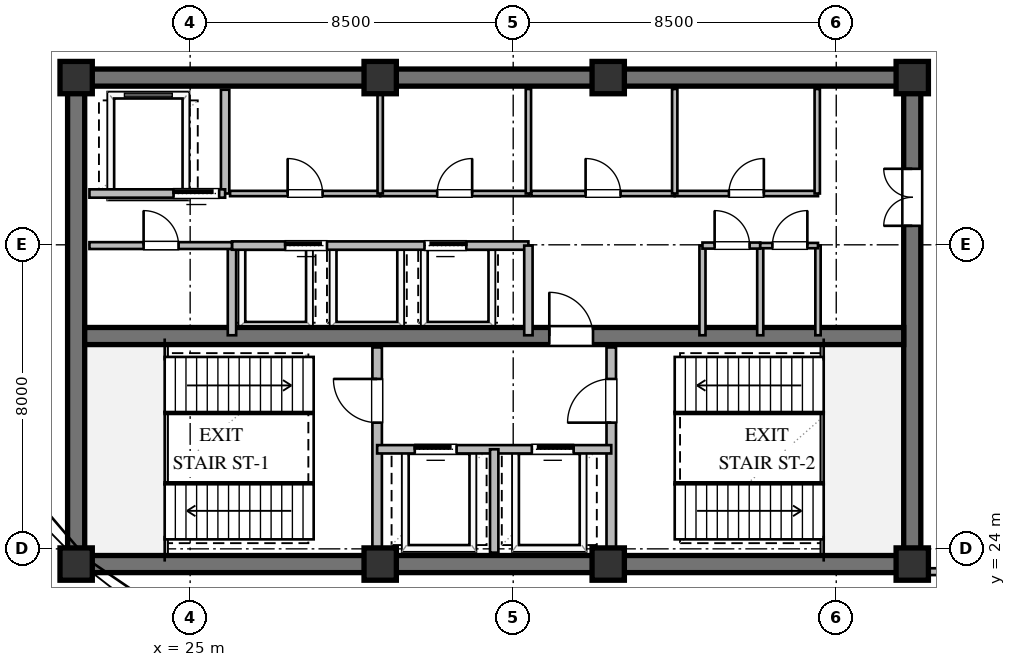
"""IFC4 building model, lengths in metres.
Left out: names, types, materials, properties, quantities, classifications, styles, units other than length and angle.
Written with IfcOpenShell. Run it as: python <this file> out.ifc"""

import sys

from ifc_helpers import new_model, si_unit, direction, frame, frame_2d, origin, origin_2d, place, context, subcontext, project, spatial, rectangle, extrude, element, fill, save


model = new_model("IFC4")
c1 = context("Model", 3, precision=1e-05, world=origin(), true_north=direction((0.0, 1.0)))
c2 = subcontext(c1, "Body", "Model", "MODEL_VIEW")
j1 = project(units=[si_unit("LENGTHUNIT", "METRE"), si_unit("PLANEANGLEUNIT", "RADIAN")], contexts=[c1])
p1 = place(None, origin())
s1 = spatial("IfcSite", under=j1, at=p1, CompositionType="ELEMENT")
p2 = place(p1, origin())
s2 = spatial("IfcBuilding", under=s1, at=p2, CompositionType="ELEMENT")
p3 = place(p2, frame((0.0, 0.0, 253.2)))
s3 = spatial("IfcBuildingStorey", under=s2, at=p3, CompositionType="ELEMENT", Elevation=253.2)
for number, where, z_axis, x_axis in (
    (1, (21.775, 23.6, 0.0), (0.0, 0.0, 1.0), (1.0, 0.0, 0.0)),
    (2, (21.775, 36.4, 0.0), (0.0, 0.0, 1.0), (1.0, 0.0, 0.0)),
):
    element("IfcWall", number, at=place(p3, frame(where, z_axis=z_axis, x_axis=x_axis)), inside=s3, PredefinedType="SHEAR", context=c2, shape_type="SweptSolid", body=[
        extrude(rectangle(XDim=22.45, YDim=0.45, at=frame_2d((11.225, 0.0))), origin(), (0.0, 0.0, 1.0), 5.16),
    ])
p4 = place(p3, frame((22.0, 23.825, 0.0), z_axis=(0.0, 0.0, 1.0), x_axis=(0.0, 1.0, 0.0)))
e3 = element("IfcWall", 3, at=p4, inside=s3, PredefinedType="SHEAR", context=c2, shape_type="SweptSolid", body=[
    extrude(rectangle(XDim=12.35, YDim=0.45, at=frame_2d((6.175, 0.0))), origin(), (0.0, 0.0, 1.0), 5.16),
])
p5 = place(p3, frame((44.0, 23.825, 0.0), z_axis=(0.0, 0.0, 1.0), x_axis=(0.0, 1.0, 0.0)))
e4 = element("IfcWall", 4, at=p5, inside=s3, PredefinedType="SHEAR", context=c2, shape_type="SweptSolid", body=[
    extrude(rectangle(XDim=12.35, YDim=0.45, at=frame_2d((6.175, 0.0))), origin(), (0.0, 0.0, 1.0), 5.16),
])
p6 = place(p5, frame((8.675, 0.0, 0.0)))
e5 = element("IfcOpeningElement", 5, at=p6, cuts=e4, PredefinedType="OPENING", context=c2, shape_type="SweptSolid", body=[
    extrude(rectangle(XDim=1.5, YDim=2.15, at=frame_2d((0.75, 1.075))), frame((0.0, 0.235, 0.0), z_axis=(0.0, -1.0, 0.0), x_axis=(1.0, 0.0, 0.0)), (0.0, 0.0, 1.0), 0.47),
])
p7 = place(p3, frame((22.225, 29.6, 0.0), z_axis=(0.0, 0.0, 1.0), x_axis=(1.0, 0.0, 0.0)))
e6 = element("IfcWall", 6, at=p7, inside=s3, PredefinedType="SHEAR", context=c2, shape_type="SweptSolid", body=[
    extrude(rectangle(XDim=21.55, YDim=0.45, at=frame_2d((10.775, 0.0))), origin(), (0.0, 0.0, 1.0), 5.16),
])
p8 = place(p7, frame((12.225, 0.0, 0.0)))
e7 = element("IfcOpeningElement", 7, at=p8, cuts=e6, PredefinedType="OPENING", context=c2, shape_type="SweptSolid", body=[
    extrude(rectangle(XDim=1.15, YDim=2.1, at=frame_2d((0.575, 1.05))), frame((0.0, 0.235, 0.0), z_axis=(0.0, -1.0, 0.0), x_axis=(1.0, 0.0, 0.0)), (0.0, 0.0, 1.0), 0.47),
])
for number, where, z_axis, x_axis in (
    (8, (22.0, 23.6, 0.0), (0.0, 0.0, 1.0), (1.0, 0.0, 0.0)),
    (9, (30.0, 23.6, 0.0), (0.0, 0.0, 1.0), (1.0, 0.0, 0.0)),
    (10, (36.0, 23.6, 0.0), (0.0, 0.0, 1.0), (1.0, 0.0, 0.0)),
    (11, (44.0, 23.6, 0.0), (0.0, 0.0, 1.0), (1.0, 0.0, 0.0)),
    (12, (44.0, 36.4, 0.0), (0.0, 0.0, 1.0), (1.0, 0.0, 0.0)),
    (13, (36.0, 36.4, 0.0), (0.0, 0.0, 1.0), (1.0, 0.0, 0.0)),
    (14, (30.0, 36.4, 0.0), (0.0, 0.0, 1.0), (1.0, 0.0, 0.0)),
    (15, (22.0, 36.4, 0.0), (0.0, 0.0, 1.0), (1.0, 0.0, 0.0)),
):
    element("IfcColumn", number, at=place(p3, frame(where, z_axis=z_axis, x_axis=x_axis)), inside=s3, PredefinedType="COLUMN", context=c2, shape_type="SweptSolid", body=[
        extrude(rectangle(XDim=0.85, YDim=0.85, at=origin_2d()), origin(), (0.0, 0.0, 1.0), 5.4),
    ])
p9 = place(p3, frame((29.92, 23.9, 0.0), z_axis=(0.0, 0.0, 1.0), x_axis=(0.0, 1.0, 0.0)))
e16 = element("IfcWall", 16, at=p9, inside=s3, PredefinedType="SOLIDWALL", context=c2, shape_type="SweptSolid", body=[
    extrude(rectangle(XDim=5.4, YDim=0.25, at=frame_2d((2.7, 0.0))), origin(), (0.0, 0.0, 1.0), 3.65),
])
p10 = place(p9, frame((3.421, 0.0, 0.0)))
e17 = element("IfcOpeningElement", 17, at=p10, cuts=e16, PredefinedType="OPENING", context=c2, shape_type="SweptSolid", body=[
    extrude(rectangle(XDim=1.15, YDim=2.1, at=frame_2d((0.575, 1.05))), frame((0.0, 0.135, 0.0), z_axis=(0.0, -1.0, 0.0), x_axis=(1.0, 0.0, 0.0)), (0.0, 0.0, 1.0), 0.27),
])
p11 = place(p3, frame((36.08, 23.9, 0.0), z_axis=(0.0, 0.0, 1.0), x_axis=(0.0, 1.0, 0.0)))
e18 = element("IfcWall", 18, at=p11, inside=s3, PredefinedType="SOLIDWALL", context=c2, shape_type="SweptSolid", body=[
    extrude(rectangle(XDim=5.4, YDim=0.25, at=frame_2d((2.7, 0.0))), origin(), (0.0, 0.0, 1.0), 5.16),
])
p12 = place(p11, frame((3.421, 0.0, 0.0)))
e19 = element("IfcOpeningElement", 19, at=p12, cuts=e18, PredefinedType="OPENING", context=c2, shape_type="SweptSolid", body=[
    extrude(rectangle(XDim=1.15, YDim=2.1, at=frame_2d((0.575, 1.05))), frame((0.0, 0.135, 0.0), z_axis=(0.0, -1.0, 0.0), x_axis=(1.0, 0.0, 0.0)), (0.0, 0.0, 1.0), 0.27),
])
p13 = place(p3, frame((29.92, 26.62, 0.0), z_axis=(0.0, 0.0, 1.0), x_axis=(1.0, 0.0, 0.0)))
e20 = element("IfcWall", 20, at=p13, inside=s3, PredefinedType="SOLIDWALL", context=c2, shape_type="SweptSolid", body=[
    extrude(rectangle(XDim=6.16, YDim=0.22, at=frame_2d((3.08, 0.0))), origin(), (0.0, 0.0, 1.0), 5.16),
])
p14 = place(p13, frame((0.99, 0.0, 0.0)))
e21 = element("IfcOpeningElement", 21, at=p14, cuts=e20, PredefinedType="OPENING", context=c2, shape_type="SweptSolid", body=[
    extrude(rectangle(XDim=1.1, YDim=2.1, at=frame_2d((0.55, 1.05))), frame((0.0, 0.12, 0.0), z_axis=(0.0, -1.0, 0.0), x_axis=(1.0, 0.0, 0.0)), (0.0, 0.0, 1.0), 0.24),
])
p15 = place(p13, frame((4.07, 0.0, 0.0)))
e22 = element("IfcOpeningElement", 22, at=p15, cuts=e20, PredefinedType="OPENING", context=c2, shape_type="SweptSolid", body=[
    extrude(rectangle(XDim=1.1, YDim=2.1, at=frame_2d((0.55, 1.05))), frame((0.0, 0.12, 0.0), z_axis=(0.0, -1.0, 0.0), x_axis=(1.0, 0.0, 0.0)), (0.0, 0.0, 1.0), 0.24),
])
p16 = place(p3, frame((33.0, 23.9, 0.0), z_axis=(0.0, 0.0, 1.0), x_axis=(0.0, 1.0, 0.0)))
e23 = element("IfcWall", 23, at=p16, inside=s3, PredefinedType="SOLIDWALL", context=c2, shape_type="SweptSolid", body=[
    extrude(rectangle(XDim=2.72, YDim=0.22, at=frame_2d((1.36, 0.0))), origin(), (0.0, 0.0, 1.0), 5.16),
])
p17 = place(p3, frame((25.92, 33.35, 0.0), z_axis=(0.0, 0.0, 1.0), x_axis=(0.0, 1.0, 0.0)))
e24 = element("IfcWall", 24, at=p17, inside=s3, PredefinedType="SOLIDWALL", context=c2, shape_type="SweptSolid", body=[
    extrude(rectangle(XDim=2.73, YDim=0.22, at=frame_2d((1.365, 0.0))), origin(), (0.0, 0.0, 1.0), 5.16),
])
p18 = place(p3, frame((22.35, 33.35, 0.0), z_axis=(0.0, 0.0, 1.0), x_axis=(1.0, 0.0, 0.0)))
e25 = element("IfcWall", 25, at=p18, inside=s3, PredefinedType="SOLIDWALL", context=c2, shape_type="SweptSolid", body=[
    extrude(rectangle(XDim=3.57, YDim=0.22, at=frame_2d((1.785, 0.0))), origin(), (0.0, 0.0, 1.0), 5.16),
])
p19 = place(p18, frame((2.213, 0.0, 0.0)))
e26 = element("IfcOpeningElement", 26, at=p19, cuts=e25, PredefinedType="OPENING", context=c2, shape_type="SweptSolid", body=[
    extrude(rectangle(XDim=1.2, YDim=2.1, at=frame_2d((0.6, 1.05))), frame((0.0, 0.12, 0.0), z_axis=(0.0, -1.0, 0.0), x_axis=(1.0, 0.0, 0.0)), (0.0, 0.0, 1.0), 0.24),
])
p20 = place(p3, frame((26.1, 29.62, 0.0), z_axis=(0.0, 0.0, 1.0), x_axis=(0.0, 1.0, 0.0)))
e27 = element("IfcWall", 27, at=p20, inside=s3, PredefinedType="SOLIDWALL", context=c2, shape_type="SweptSolid", body=[
    extrude(rectangle(XDim=2.36, YDim=0.22, at=frame_2d((1.18, 0.0))), origin(), (0.0, 0.0, 1.0), 5.16),
])
p21 = place(p3, frame((26.1, 31.98, 0.0), z_axis=(0.0, 0.0, 1.0), x_axis=(1.0, 0.0, 0.0)))
e28 = element("IfcWall", 28, at=p21, inside=s3, PredefinedType="SOLIDWALL", context=c2, shape_type="SweptSolid", body=[
    extrude(rectangle(XDim=7.8, YDim=0.22, at=frame_2d((3.9, 0.0))), origin(), (0.0, 0.0, 1.0), 5.16),
])
p22 = place(p21, frame((1.4, 0.0, 0.0)))
e29 = element("IfcOpeningElement", 29, at=p22, cuts=e28, PredefinedType="OPENING", context=c2, shape_type="SweptSolid", body=[
    extrude(rectangle(XDim=1.1, YDim=2.1, at=frame_2d((0.55, 1.05))), frame((0.0, 0.12, 0.0), z_axis=(0.0, -1.0, 0.0), x_axis=(1.0, 0.0, 0.0)), (0.0, 0.0, 1.0), 0.24),
])
p23 = place(p21, frame((5.066, 0.0, 0.0)))
e30 = element("IfcOpeningElement", 30, at=p23, cuts=e28, PredefinedType="OPENING", context=c2, shape_type="SweptSolid", body=[
    extrude(rectangle(XDim=1.1, YDim=2.1, at=frame_2d((0.55, 1.05))), frame((0.0, 0.12, 0.0), z_axis=(0.0, -1.0, 0.0), x_axis=(1.0, 0.0, 0.0)), (0.0, 0.0, 1.0), 0.24),
])
p24 = place(p3, frame((33.9, 29.62, 0.0), z_axis=(0.0, 0.0, 1.0), x_axis=(0.0, 1.0, 0.0)))
e31 = element("IfcWall", 31, at=p24, inside=s3, PredefinedType="SOLIDWALL", context=c2, shape_type="SweptSolid", body=[
    extrude(rectangle(XDim=2.36, YDim=0.22, at=frame_2d((1.18, 0.0))), origin(), (0.0, 0.0, 1.0), 5.16),
])
p25 = place(p3, frame((26.05, 33.35, 0.0), z_axis=(0.0, 0.0, 1.0), x_axis=(1.0, 0.0, 0.0)))
e32 = element("IfcWall", 32, at=p25, inside=s3, PredefinedType="PARTITIONING", context=c2, shape_type="SweptSolid", body=[
    extrude(rectangle(XDim=3.95, YDim=0.14, at=frame_2d((1.975, 0.0))), origin(), (0.0, 0.0, 1.0), 5.16),
])
p26 = place(p25, frame((1.515, 0.0, 0.0)))
e33 = element("IfcOpeningElement", 33, at=p26, cuts=e32, PredefinedType="OPENING", context=c2, shape_type="SweptSolid", body=[
    extrude(rectangle(XDim=0.92, YDim=2.1, at=frame_2d((0.46, 1.05))), frame((0.0, 0.08, 0.0), z_axis=(0.0, -1.0, 0.0), x_axis=(1.0, 0.0, 0.0)), (0.0, 0.0, 1.0), 0.16),
])
p27 = place(p3, frame((30.0, 33.35, 0.0), z_axis=(0.0, 0.0, 1.0), x_axis=(1.0, 0.0, 0.0)))
e34 = element("IfcWall", 34, at=p27, inside=s3, PredefinedType="PARTITIONING", context=c2, shape_type="SweptSolid", body=[
    extrude(rectangle(XDim=3.92, YDim=0.14, at=frame_2d((1.96, 0.0))), origin(), (0.0, 0.0, 1.0), 5.16),
])
p28 = place(p27, frame((1.5, 0.0, 0.0)))
e35 = element("IfcOpeningElement", 35, at=p28, cuts=e34, PredefinedType="OPENING", context=c2, shape_type="SweptSolid", body=[
    extrude(rectangle(XDim=0.92, YDim=2.1, at=frame_2d((0.46, 1.05))), frame((0.0, 0.08, 0.0), z_axis=(0.0, -1.0, 0.0), x_axis=(1.0, 0.0, 0.0)), (0.0, 0.0, 1.0), 0.16),
])
for number, where, z_axis, x_axis in (
    (36, (30.0, 33.35, 0.0), (0.0, 0.0, 1.0), (0.0, 1.0, 0.0)),
    (37, (33.9, 33.35, 0.0), (0.0, 0.0, 1.0), (0.0, 1.0, 0.0)),
):
    element("IfcWall", number, at=place(p3, frame(where, z_axis=z_axis, x_axis=x_axis)), inside=s3, PredefinedType="PARTITIONING", context=c2, shape_type="SweptSolid", body=[
        extrude(rectangle(XDim=2.75, YDim=0.14, at=frame_2d((1.375, 0.0))), origin(), (0.0, 0.0, 1.0), 5.16),
    ])
p29 = place(p3, frame((33.98, 33.35, 0.0), z_axis=(0.0, 0.0, 1.0), x_axis=(1.0, 0.0, 0.0)))
e38 = element("IfcWall", 38, at=p29, inside=s3, PredefinedType="PARTITIONING", context=c2, shape_type="SweptSolid", body=[
    extrude(rectangle(XDim=3.77, YDim=0.14, at=frame_2d((1.885, 0.0))), origin(), (0.0, 0.0, 1.0), 5.16),
])
p30 = place(p29, frame((1.425, 0.0, 0.0)))
e39 = element("IfcOpeningElement", 39, at=p30, cuts=e38, PredefinedType="OPENING", context=c2, shape_type="SweptSolid", body=[
    extrude(rectangle(XDim=0.92, YDim=2.1, at=frame_2d((0.46, 1.05))), frame((0.0, 0.08, 0.0), z_axis=(0.0, -1.0, 0.0), x_axis=(1.0, 0.0, 0.0)), (0.0, 0.0, 1.0), 0.16),
])
p31 = place(p3, frame((37.75, 33.35, 0.0), z_axis=(0.0, 0.0, 1.0), x_axis=(1.0, 0.0, 0.0)))
e40 = element("IfcWall", 40, at=p31, inside=s3, PredefinedType="PARTITIONING", context=c2, shape_type="SweptSolid", body=[
    extrude(rectangle(XDim=3.77, YDim=0.14, at=frame_2d((1.885, 0.0))), origin(), (0.0, 0.0, 1.0), 5.16),
])
p32 = place(p31, frame((1.425, 0.0, 0.0)))
e41 = element("IfcOpeningElement", 41, at=p32, cuts=e40, PredefinedType="OPENING", context=c2, shape_type="SweptSolid", body=[
    extrude(rectangle(XDim=0.92, YDim=2.1, at=frame_2d((0.46, 1.05))), frame((0.0, 0.08, 0.0), z_axis=(0.0, -1.0, 0.0), x_axis=(1.0, 0.0, 0.0)), (0.0, 0.0, 1.0), 0.16),
])
for number, where, z_axis, x_axis in (
    (42, (37.75, 33.35, 0.0), (0.0, 0.0, 1.0), (0.0, 1.0, 0.0)),
    (43, (41.5, 33.35, 0.0), (0.0, 0.0, 1.0), (0.0, 1.0, 0.0)),
):
    element("IfcWall", number, at=place(p3, frame(where, z_axis=z_axis, x_axis=x_axis)), inside=s3, PredefinedType="PARTITIONING", context=c2, shape_type="SweptSolid", body=[
        extrude(rectangle(XDim=2.75, YDim=0.14, at=frame_2d((1.375, 0.0))), origin(), (0.0, 0.0, 1.0), 5.16),
    ])
p33 = place(p3, frame((22.35, 31.98, 0.0), z_axis=(0.0, 0.0, 1.0), x_axis=(1.0, 0.0, 0.0)))
e44 = element("IfcWall", 44, at=p33, inside=s3, PredefinedType="PARTITIONING", context=c2, shape_type="SweptSolid", body=[
    extrude(rectangle(XDim=3.75, YDim=0.18, at=frame_2d((1.875, 0.0))), origin(), (0.0, 0.0, 1.0), 5.16),
])
p34 = place(p33, frame((1.425, 0.0, 0.0)))
e45 = element("IfcOpeningElement", 45, at=p34, cuts=e44, PredefinedType="OPENING", context=c2, shape_type="SweptSolid", body=[
    extrude(rectangle(XDim=0.92, YDim=2.1, at=frame_2d((0.46, 1.05))), frame((0.0, 0.1, 0.0), z_axis=(0.0, -1.0, 0.0), x_axis=(1.0, 0.0, 0.0)), (0.0, 0.0, 1.0), 0.2),
])
for number, where, z_axis, x_axis in (
    (46, (38.48, 29.62, 0.0), (0.0, 0.0, 1.0), (0.0, 1.0, 0.0)),
    (47, (40.0, 29.62, 0.0), (0.0, 0.0, 1.0), (0.0, 1.0, 0.0)),
):
    element("IfcWall", number, at=place(p3, frame(where, z_axis=z_axis, x_axis=x_axis)), inside=s3, PredefinedType="PLUMBINGWALL", context=c2, shape_type="SweptSolid", body=[
        extrude(rectangle(XDim=2.36, YDim=0.16, at=frame_2d((1.18, 0.0))), origin(), (0.0, 0.0, 1.0), 5.16),
    ])
p35 = place(p3, frame((41.52, 29.62, 0.0), z_axis=(0.0, 0.0, 1.0), x_axis=(0.0, 1.0, 0.0)))
e48 = element("IfcWall", 48, at=p35, inside=s3, PredefinedType="PARTITIONING", context=c2, shape_type="SweptSolid", body=[
    extrude(rectangle(XDim=2.36, YDim=0.14, at=frame_2d((1.18, 0.0))), origin(), (0.0, 0.0, 1.0), 2.187),
])
p36 = place(p3, frame((38.48, 31.98, 0.0), z_axis=(0.0, 0.0, 1.0), x_axis=(1.0, 0.0, 0.0)))
e49 = element("IfcWall", 49, at=p36, inside=s3, PredefinedType="PLUMBINGWALL", context=c2, shape_type="SweptSolid", body=[
    extrude(rectangle(XDim=1.52, YDim=0.16, at=frame_2d((0.76, 0.0))), origin(), (0.0, 0.0, 1.0), 5.16),
])
p37 = place(p36, frame((0.32, 0.0, 0.0)))
e50 = element("IfcOpeningElement", 50, at=p37, cuts=e49, PredefinedType="OPENING", context=c2, shape_type="SweptSolid", body=[
    extrude(rectangle(XDim=0.92, YDim=2.1, at=frame_2d((0.46, 1.05))), frame((0.0, 0.09, 0.0), z_axis=(0.0, -1.0, 0.0), x_axis=(1.0, 0.0, 0.0)), (0.0, 0.0, 1.0), 0.18),
])
p38 = place(p3, frame((40.0, 31.98, 0.0), z_axis=(0.0, 0.0, 1.0), x_axis=(1.0, 0.0, 0.0)))
e51 = element("IfcWall", 51, at=p38, inside=s3, PredefinedType="PARTITIONING", context=c2, shape_type="SweptSolid", body=[
    extrude(rectangle(XDim=1.52, YDim=0.14, at=frame_2d((0.76, 0.0))), origin(), (0.0, 0.0, 1.0), 5.16),
])
p39 = place(p38, frame((0.32, 0.0, 0.0)))
e52 = element("IfcOpeningElement", 52, at=p39, cuts=e51, PredefinedType="OPENING", context=c2, shape_type="SweptSolid", body=[
    extrude(rectangle(XDim=0.92, YDim=2.1, at=frame_2d((0.46, 1.05))), frame((0.0, 0.08, 0.0), z_axis=(0.0, -1.0, 0.0), x_axis=(1.0, 0.0, 0.0)), (0.0, 0.0, 1.0), 0.16),
])
p40 = place(p3, frame((44.225, 23.4, 0.0), z_axis=(0.0, 0.0, 1.0), x_axis=(1.0, 0.0, 0.0)))
e53 = element("IfcWall", 53, at=p40, inside=s3, PredefinedType="PARTITIONING", context=c2, shape_type="SweptSolid", body=[
    extrude(rectangle(XDim=8.275, YDim=0.18, at=frame_2d((4.137, 0.0))), origin(), (0.0, 0.0, 1.0), 3.65),
])
p41 = place(p10, origin())
e54 = element("IfcDoor", 54, at=p41, inside=s3, OperationType="SINGLE_SWING_RIGHT", PredefinedType="DOOR", context=c2, shape_type="SweptSolid", body=[
    extrude(rectangle(XDim=1.15, YDim=2.1, at=frame_2d((0.575, 1.05))), frame((0.0, 0.025, 0.0), z_axis=(0.0, -1.0, 0.0), x_axis=(1.0, 0.0, 0.0)), (0.0, 0.0, 1.0), 0.05),
])
fill(e17, e54)
p42 = place(p12, origin())
e55 = element("IfcDoor", 55, at=p42, inside=s3, OperationType="SINGLE_SWING_LEFT", PredefinedType="DOOR", context=c2, shape_type="SweptSolid", body=[
    extrude(rectangle(XDim=1.15, YDim=2.1, at=frame_2d((0.575, 1.05))), frame((0.0, 0.025, 0.0), z_axis=(0.0, -1.0, 0.0), x_axis=(1.0, 0.0, 0.0)), (0.0, 0.0, 1.0), 0.05),
])
fill(e19, e55)
p43 = place(p14, origin())
e56 = element("IfcDoor", 56, at=p43, inside=s3, OperationType="SLIDING_TO_LEFT", PredefinedType="DOOR", context=c2, shape_type="SweptSolid", body=[
    extrude(rectangle(XDim=1.1, YDim=2.1, at=frame_2d((0.55, 1.05))), frame((0.0, 0.025, 0.0), z_axis=(0.0, -1.0, 0.0), x_axis=(1.0, 0.0, 0.0)), (0.0, 0.0, 1.0), 0.05),
])
fill(e21, e56)
p44 = place(p15, origin())
e57 = element("IfcDoor", 57, at=p44, inside=s3, OperationType="SLIDING_TO_RIGHT", PredefinedType="DOOR", context=c2, shape_type="SweptSolid", body=[
    extrude(rectangle(XDim=1.1, YDim=2.1, at=frame_2d((0.55, 1.05))), frame((0.0, 0.025, 0.0), z_axis=(0.0, -1.0, 0.0), x_axis=(1.0, 0.0, 0.0)), (0.0, 0.0, 1.0), 0.05),
])
fill(e22, e57)
p45 = place(p8, origin())
e58 = element("IfcDoor", 58, at=p45, inside=s3, OperationType="SINGLE_SWING_LEFT", PredefinedType="DOOR", context=c2, shape_type="SweptSolid", body=[
    extrude(rectangle(XDim=1.15, YDim=2.1, at=frame_2d((0.575, 1.05))), frame((0.0, 0.025, 0.0), z_axis=(0.0, -1.0, 0.0), x_axis=(1.0, 0.0, 0.0)), (0.0, 0.0, 1.0), 0.05),
])
fill(e7, e58)
p46 = place(p6, origin())
e59 = element("IfcDoor", 59, at=p46, inside=s3, OperationType="DOUBLE_DOOR_SINGLE_SWING", PredefinedType="DOOR", context=c2, shape_type="SweptSolid", body=[
    extrude(rectangle(XDim=1.5, YDim=2.15, at=frame_2d((0.75, 1.075))), frame((0.0, 0.025, 0.0), z_axis=(0.0, -1.0, 0.0), x_axis=(1.0, 0.0, 0.0)), (0.0, 0.0, 1.0), 0.05),
])
fill(e5, e59)
p47 = place(p19, origin())
e60 = element("IfcDoor", 60, at=p47, inside=s3, OperationType="SLIDING_TO_LEFT", PredefinedType="DOOR", context=c2, shape_type="SweptSolid", body=[
    extrude(rectangle(XDim=1.2, YDim=2.1, at=frame_2d((0.6, 1.05))), frame((0.0, 0.025, 0.0), z_axis=(0.0, -1.0, 0.0), x_axis=(1.0, 0.0, 0.0)), (0.0, 0.0, 1.0), 0.05),
])
fill(e26, e60)
p48 = place(p22, origin())
e61 = element("IfcDoor", 61, at=p48, inside=s3, OperationType="SLIDING_TO_LEFT", PredefinedType="DOOR", context=c2, shape_type="SweptSolid", body=[
    extrude(rectangle(XDim=1.1, YDim=2.1, at=frame_2d((0.55, 1.05))), frame((0.0, 0.025, 0.0), z_axis=(0.0, -1.0, 0.0), x_axis=(1.0, 0.0, 0.0)), (0.0, 0.0, 1.0), 0.05),
])
fill(e29, e61)
p49 = place(p23, origin())
e62 = element("IfcDoor", 62, at=p49, inside=s3, OperationType="SLIDING_TO_RIGHT", PredefinedType="DOOR", context=c2, shape_type="SweptSolid", body=[
    extrude(rectangle(XDim=1.1, YDim=2.1, at=frame_2d((0.55, 1.05))), frame((0.0, 0.025, 0.0), z_axis=(0.0, -1.0, 0.0), x_axis=(1.0, 0.0, 0.0)), (0.0, 0.0, 1.0), 0.05),
])
fill(e30, e62)
p50 = place(p26, origin())
e63 = element("IfcDoor", 63, at=p50, inside=s3, OperationType="SINGLE_SWING_LEFT", PredefinedType="DOOR", context=c2, shape_type="SweptSolid", body=[
    extrude(rectangle(XDim=0.92, YDim=2.1, at=frame_2d((0.46, 1.05))), frame((0.0, 0.025, 0.0), z_axis=(0.0, -1.0, 0.0), x_axis=(1.0, 0.0, 0.0)), (0.0, 0.0, 1.0), 0.05),
])
fill(e33, e63)
p51 = place(p28, origin())
e64 = element("IfcDoor", 64, at=p51, inside=s3, OperationType="SINGLE_SWING_RIGHT", PredefinedType="DOOR", context=c2, shape_type="SweptSolid", body=[
    extrude(rectangle(XDim=0.92, YDim=2.1, at=frame_2d((0.46, 1.05))), frame((0.0, 0.025, 0.0), z_axis=(0.0, -1.0, 0.0), x_axis=(1.0, 0.0, 0.0)), (0.0, 0.0, 1.0), 0.05),
])
fill(e35, e64)
p52 = place(p30, origin())
e65 = element("IfcDoor", 65, at=p52, inside=s3, OperationType="SINGLE_SWING_LEFT", PredefinedType="DOOR", context=c2, shape_type="SweptSolid", body=[
    extrude(rectangle(XDim=0.92, YDim=2.1, at=frame_2d((0.46, 1.05))), frame((0.0, 0.025, 0.0), z_axis=(0.0, -1.0, 0.0), x_axis=(1.0, 0.0, 0.0)), (0.0, 0.0, 1.0), 0.05),
])
fill(e39, e65)
p53 = place(p32, origin())
e66 = element("IfcDoor", 66, at=p53, inside=s3, OperationType="SINGLE_SWING_RIGHT", PredefinedType="DOOR", context=c2, shape_type="SweptSolid", body=[
    extrude(rectangle(XDim=0.92, YDim=2.1, at=frame_2d((0.46, 1.05))), frame((0.0, 0.025, 0.0), z_axis=(0.0, -1.0, 0.0), x_axis=(1.0, 0.0, 0.0)), (0.0, 0.0, 1.0), 0.05),
])
fill(e41, e66)
p54 = place(p34, origin())
e67 = element("IfcDoor", 67, at=p54, inside=s3, OperationType="SINGLE_SWING_LEFT", PredefinedType="DOOR", context=c2, shape_type="SweptSolid", body=[
    extrude(rectangle(XDim=0.92, YDim=2.1, at=frame_2d((0.46, 1.05))), frame((0.0, 0.025, 0.0), z_axis=(0.0, -1.0, 0.0), x_axis=(1.0, 0.0, 0.0)), (0.0, 0.0, 1.0), 0.05),
])
fill(e45, e67)
p55 = place(p37, origin())
e68 = element("IfcDoor", 68, at=p55, inside=s3, OperationType="SINGLE_SWING_LEFT", PredefinedType="DOOR", context=c2, shape_type="SweptSolid", body=[
    extrude(rectangle(XDim=0.92, YDim=2.1, at=frame_2d((0.46, 1.05))), frame((0.0, 0.025, 0.0), z_axis=(0.0, -1.0, 0.0), x_axis=(1.0, 0.0, 0.0)), (0.0, 0.0, 1.0), 0.05),
])
fill(e50, e68)
p56 = place(p39, origin())
e69 = element("IfcDoor", 69, at=p56, inside=s3, OperationType="SINGLE_SWING_RIGHT", PredefinedType="DOOR", context=c2, shape_type="SweptSolid", body=[
    extrude(rectangle(XDim=0.92, YDim=2.1, at=frame_2d((0.46, 1.05))), frame((0.0, 0.025, 0.0), z_axis=(0.0, -1.0, 0.0), x_axis=(1.0, 0.0, 0.0)), (0.0, 0.0, 1.0), 0.05),
])
fill(e52, e69)
save(model, sys.argv[1])
